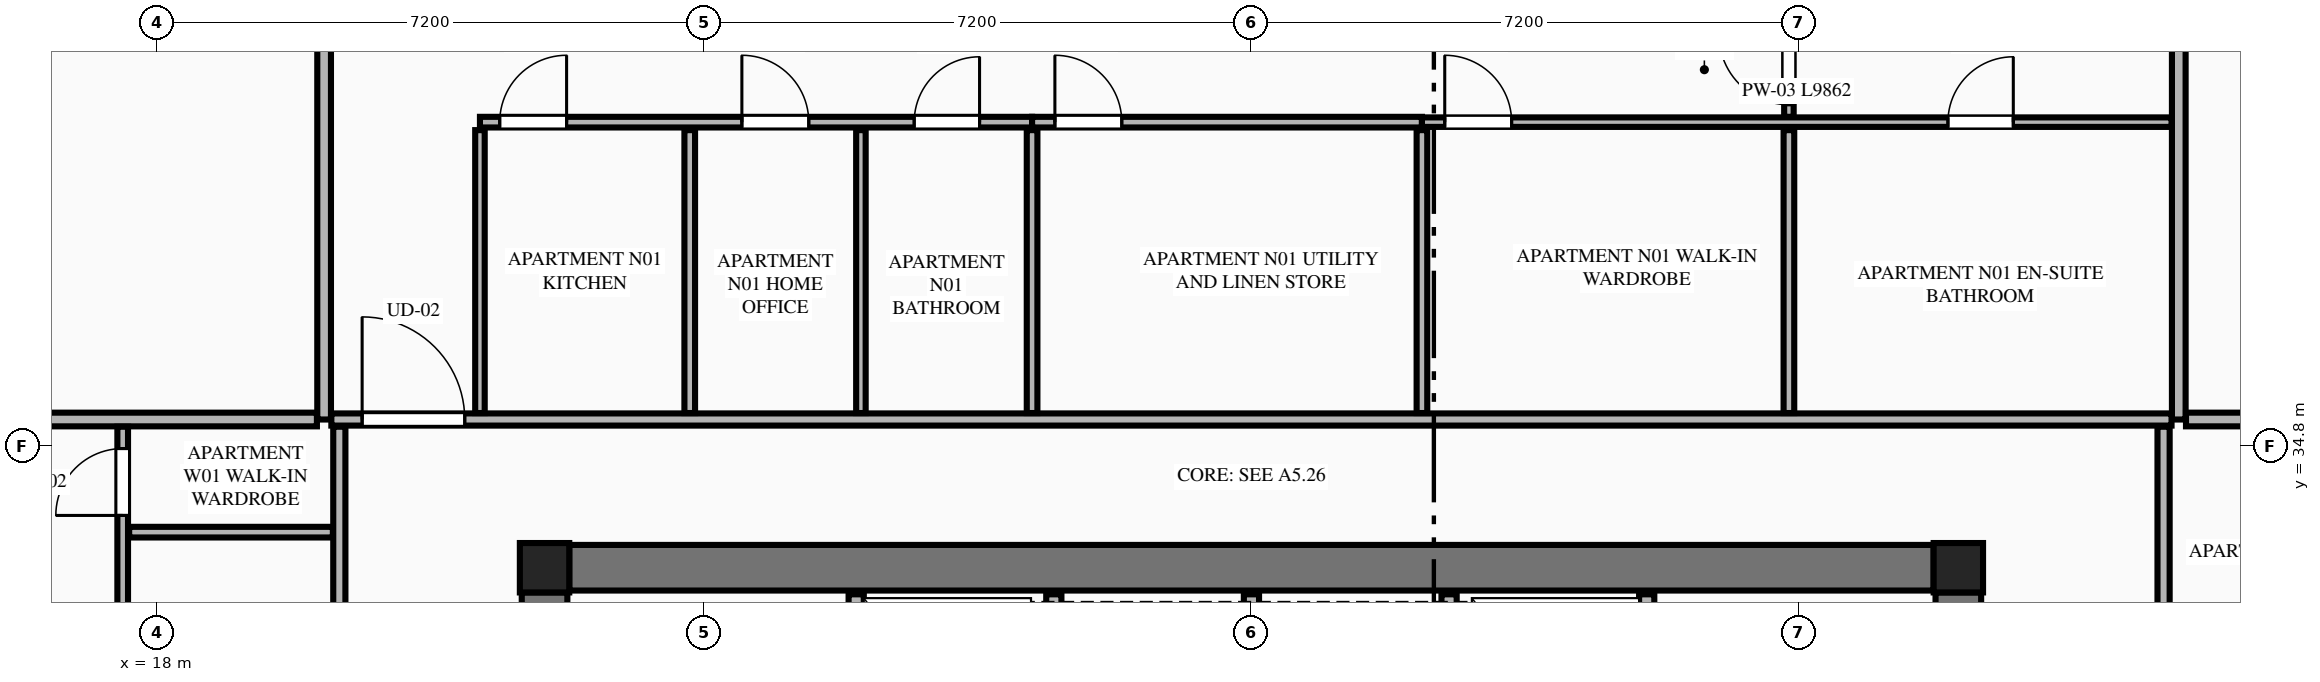
"""IFC4 building model, lengths in metres.
Left out: names, types, materials, properties, quantities, classifications, styles, units other than length and angle.
Written with IfcOpenShell. Run it as: python <this file> out.ifc"""

import sys

from ifc_helpers import new_model, si_unit, direction, frame, frame_2d, origin, origin_2d, place, context, subcontext, project, spatial, rectangle, extrude, element, fill, save


model = new_model("IFC4")
c1 = context("Model", 3, precision=1e-05, world=origin(), true_north=direction((0.0, 1.0)))
c2 = subcontext(c1, "Body", "Model", "MODEL_VIEW")
j1 = project(units=[si_unit("LENGTHUNIT", "METRE"), si_unit("PLANEANGLEUNIT", "RADIAN")], contexts=[c1])
p1 = place(None, origin())
s1 = spatial("IfcSite", under=j1, at=p1, CompositionType="ELEMENT")
p2 = place(p1, origin())
s2 = spatial("IfcBuilding", under=s1, at=p2, CompositionType="ELEMENT")
p3 = place(p2, frame((0.0, 0.0, 210.95)))
s3 = spatial("IfcBuildingStorey", under=s2, at=p3, CompositionType="ELEMENT", Elevation=210.95)
for number, where, z_axis, x_axis in (
    (1, (41.7, 33.2, 0.0), (0.0, 0.0, 1.0), (1.0, 0.0, 0.0)),
    (2, (23.1, 33.2, 0.0), (0.0, 0.0, 1.0), (1.0, 0.0, 0.0)),
):
    element("IfcColumn", number, at=place(p3, frame(where, z_axis=z_axis, x_axis=x_axis)), inside=s3, PredefinedType="COLUMN", context=c2, shape_type="SweptSolid", body=[
        extrude(rectangle(XDim=0.65, YDim=0.65, at=origin_2d()), origin(), (0.0, 0.0, 1.0), 3.55),
    ])
p4 = place(p3, frame((23.425, 33.2, 0.0), z_axis=(0.0, 0.0, 1.0), x_axis=(1.0, 0.0, 0.0)))
e3 = element("IfcWall", 3, at=p4, inside=s3, PredefinedType="SHEAR", context=c2, shape_type="SweptSolid", body=[
    extrude(rectangle(XDim=17.95, YDim=0.6, at=frame_2d((8.975, 0.0))), origin(), (0.0, 0.0, 1.0), 3.35),
])
p5 = place(p3, frame((23.1, 18.925, 0.0), z_axis=(0.0, 0.0, 1.0), x_axis=(0.0, 1.0, 0.0)))
e4 = element("IfcWall", 4, at=p5, inside=s3, PredefinedType="SHEAR", context=c2, shape_type="SweptSolid", body=[
    extrude(rectangle(XDim=13.95, YDim=0.6, at=frame_2d((6.975, 0.0))), origin(), (0.0, 0.0, 1.0), 3.35),
])
p6 = place(p5, frame((2.915, 0.0, 0.0)))
e5 = element("IfcOpeningElement", 5, at=p6, cuts=e4, PredefinedType="OPENING", context=c2, shape_type="SweptSolid", body=[
    extrude(rectangle(XDim=1.22, YDim=2.25, at=frame_2d((0.61, 1.125))), frame((0.0, 0.31, 0.0), z_axis=(0.0, -1.0, 0.0), x_axis=(1.0, 0.0, 0.0)), (0.0, 0.0, 1.0), 0.62),
])
p7 = place(p3, frame((41.7, 18.925, 0.0), z_axis=(0.0, 0.0, 1.0), x_axis=(0.0, 1.0, 0.0)))
e6 = element("IfcWall", 6, at=p7, inside=s3, PredefinedType="SHEAR", context=c2, shape_type="SweptSolid", body=[
    extrude(rectangle(XDim=13.95, YDim=0.6, at=frame_2d((6.975, 0.0))), origin(), (0.0, 0.0, 1.0), 3.35),
])
p8 = place(p7, frame((2.915, 0.0, 0.0)))
e7 = element("IfcOpeningElement", 7, at=p8, cuts=e6, PredefinedType="OPENING", context=c2, shape_type="SweptSolid", body=[
    extrude(rectangle(XDim=1.22, YDim=2.25, at=frame_2d((0.61, 1.125))), frame((0.0, 0.31, 0.0), z_axis=(0.0, -1.0, 0.0), x_axis=(1.0, 0.0, 0.0)), (0.0, 0.0, 1.0), 0.62),
])
for number, where, z_axis, x_axis in (
    (8, (27.2, 30.0, 0.0), (0.0, 0.0, 1.0), (0.0, 1.0, 0.0)),
    (9, (29.8, 30.0, 0.0), (0.0, 0.0, 1.0), (0.0, 1.0, 0.0)),
    (10, (32.4, 30.0, 0.0), (0.0, 0.0, 1.0), (0.0, 1.0, 0.0)),
    (11, (35.0, 30.0, 0.0), (0.0, 0.0, 1.0), (0.0, 1.0, 0.0)),
    (12, (37.6, 30.0, 0.0), (0.0, 0.0, 1.0), (0.0, 1.0, 0.0)),
):
    element("IfcWall", number, at=place(p3, frame(where, z_axis=z_axis, x_axis=x_axis)), inside=s3, PredefinedType="PLUMBINGWALL", context=c2, shape_type="SweptSolid", body=[
        extrude(rectangle(XDim=2.85, YDim=0.2, at=frame_2d((1.425, 0.0))), origin(), (0.0, 0.0, 1.0), 3.35),
    ])
p9 = place(p3, frame((18.06, 43.436, 0.0), z_axis=(0.0, 0.0, 1.0), x_axis=(-0.451524246964, -0.89225884944, 0.0)))
e13 = element("IfcWall", 13, at=p9, inside=s3, PredefinedType="STANDARD", context=c2, shape_type="SweptSolid", body=[
    extrude(rectangle(XDim=4.91, YDim=0.34, at=frame_2d((2.455, 0.0))), origin(), (0.0, 0.0, 1.0), 2.883),
])
p10 = place(p9, frame((1.905, 0.0, 0.75)))
e14 = element("IfcOpeningElement", 14, at=p10, cuts=e13, PredefinedType="OPENING", context=c2, shape_type="SweptSolid", body=[
    extrude(rectangle(XDim=1.1, YDim=1.983, at=frame_2d((0.55, 0.991))), frame((0.0, 0.18, 0.0), z_axis=(0.0, -1.0, 0.0), x_axis=(1.0, 0.0, 0.0)), (0.0, 0.0, 1.0), 0.36),
])
for number, where, z_axis, x_axis in (
    (15, (20.2, 35.15, 0.0), (0.0, 0.0, 1.0), (0.0, 1.0, 0.0)),
    (16, (44.6, 35.15, 0.0), (0.0, 0.0, 1.0), (0.0, 1.0, 0.0)),
):
    element("IfcWall", number, at=place(p3, frame(where, z_axis=z_axis, x_axis=x_axis)), inside=s3, PredefinedType="PARTITIONING", context=c2, shape_type="SweptSolid", body=[
        extrude(rectangle(XDim=10.482, YDim=0.18, at=frame_2d((5.241, 0.0))), origin(), (0.0, 0.0, 1.0), 3.35),
    ])
p11 = place(p3, frame((20.295, 35.15, 0.0), z_axis=(0.0, 0.0, 1.0), x_axis=(1.0, 0.0, 0.0)))
e17 = element("IfcWall", 17, at=p11, inside=s3, PredefinedType="PARTITIONING", context=c2, shape_type="SweptSolid", body=[
    extrude(rectangle(XDim=24.21, YDim=0.16, at=frame_2d((12.105, 0.0))), origin(), (0.0, 0.0, 1.0), 3.35),
])
p12 = place(p11, frame((0.405, 0.0, 0.0)))
e18 = element("IfcOpeningElement", 18, at=p12, cuts=e17, PredefinedType="OPENING", context=c2, shape_type="SweptSolid", body=[
    extrude(rectangle(XDim=1.35, YDim=2.35, at=frame_2d((0.675, 1.175))), frame((0.0, 0.09, 0.0), z_axis=(0.0, -1.0, 0.0), x_axis=(1.0, 0.0, 0.0)), (0.0, 0.0, 1.0), 0.18),
])
p13 = place(p3, frame((22.25, 35.235, 0.0), z_axis=(0.0, 0.0, 1.0), x_axis=(0.0, 1.0, 0.0)))
e19 = element("IfcWall", 19, at=p13, inside=s3, PredefinedType="PARTITIONING", context=c2, shape_type="SweptSolid", body=[
    extrude(rectangle(XDim=3.722, YDim=0.125, at=frame_2d((1.861, 0.0))), origin(), (0.0, 0.0, 1.0), 2.807),
])
p14 = place(p3, frame((22.25, 39.062, 0.0), z_axis=(0.0, 0.0, 1.0), x_axis=(1.0, 0.0, 0.0)))
e20 = element("IfcWall", 20, at=p14, inside=s3, PredefinedType="PLUMBINGWALL", context=c2, shape_type="SweptSolid", body=[
    extrude(rectangle(XDim=7.264, YDim=0.14, at=frame_2d((3.632, 0.0))), origin(), (0.0, 0.0, 1.0), 3.35),
])
p15 = place(p14, frame((5.713, 0.0, 0.0)))
e21 = element("IfcOpeningElement", 21, at=p15, cuts=e20, PredefinedType="OPENING", context=c2, shape_type="SweptSolid", body=[
    extrude(rectangle(XDim=0.86, YDim=2.1, at=frame_2d((0.43, 1.05))), frame((0.0, 0.08, 0.0), z_axis=(0.0, -1.0, 0.0), x_axis=(1.0, 0.0, 0.0)), (0.0, 0.0, 1.0), 0.16),
])
p16 = place(p14, frame((0.26, 0.0, 0.0)))
e22 = element("IfcOpeningElement", 22, at=p16, cuts=e20, PredefinedType="OPENING", context=c2, shape_type="SweptSolid", body=[
    extrude(rectangle(XDim=0.88, YDim=2.15, at=frame_2d((0.44, 1.075))), frame((0.0, 0.08, 0.0), z_axis=(0.0, -1.0, 0.0), x_axis=(1.0, 0.0, 0.0)), (0.0, 0.0, 1.0), 0.16),
])
p17 = place(p14, frame((3.446, 0.0, 0.0)))
e23 = element("IfcOpeningElement", 23, at=p17, cuts=e20, PredefinedType="OPENING", context=c2, shape_type="SweptSolid", body=[
    extrude(rectangle(XDim=0.88, YDim=2.15, at=frame_2d((0.44, 1.075))), frame((0.0, 0.08, 0.0), z_axis=(0.0, -1.0, 0.0), x_axis=(1.0, 0.0, 0.0)), (0.0, 0.0, 1.0), 0.16),
])
p18 = place(p3, frame((29.514, 39.062, 0.0), z_axis=(0.0, 0.0, 1.0), x_axis=(1.0, 0.0, 0.0)))
e24 = element("IfcWall", 24, at=p18, inside=s3, PredefinedType="PLUMBINGWALL", context=c2, shape_type="SweptSolid", body=[
    extrude(rectangle(XDim=5.129, YDim=0.14, at=frame_2d((2.564, 0.0))), origin(), (0.0, 0.0, 1.0), 3.35),
])
p19 = place(p18, frame((0.3, 0.0, 0.0)))
e25 = element("IfcOpeningElement", 25, at=p19, cuts=e24, PredefinedType="OPENING", context=c2, shape_type="SweptSolid", body=[
    extrude(rectangle(XDim=0.88, YDim=2.15, at=frame_2d((0.44, 1.075))), frame((0.0, 0.08, 0.0), z_axis=(0.0, -1.0, 0.0), x_axis=(1.0, 0.0, 0.0)), (0.0, 0.0, 1.0), 0.16),
])
p20 = place(p3, frame((34.643, 39.062, 0.0), z_axis=(0.0, 0.0, 1.0), x_axis=(1.0, 0.0, 0.0)))
e26 = element("IfcWall", 26, at=p20, inside=s3, PredefinedType="PARTITIONING", context=c2, shape_type="SweptSolid", body=[
    extrude(rectangle(XDim=9.862, YDim=0.125, at=frame_2d((4.931, 0.0))), origin(), (0.0, 0.0, 1.0), 3.35),
])
p21 = place(p20, frame((6.92, 0.0, 0.0)))
e27 = element("IfcOpeningElement", 27, at=p21, cuts=e26, PredefinedType="OPENING", context=c2, shape_type="SweptSolid", body=[
    extrude(rectangle(XDim=0.86, YDim=2.1, at=frame_2d((0.43, 1.05))), frame((0.0, 0.073, 0.0), z_axis=(0.0, -1.0, 0.0), x_axis=(1.0, 0.0, 0.0)), (0.0, 0.0, 1.0), 0.145),
])
p22 = place(p20, frame((0.3, 0.0, 0.0)))
e28 = element("IfcOpeningElement", 28, at=p22, cuts=e26, PredefinedType="OPENING", context=c2, shape_type="SweptSolid", body=[
    extrude(rectangle(XDim=0.88, YDim=2.15, at=frame_2d((0.44, 1.075))), frame((0.0, 0.073, 0.0), z_axis=(0.0, -1.0, 0.0), x_axis=(1.0, 0.0, 0.0)), (0.0, 0.0, 1.0), 0.145),
])
p23 = place(p3, frame((25.01, 35.235, 0.0), z_axis=(0.0, 0.0, 1.0), x_axis=(0.0, 1.0, 0.0)))
e29 = element("IfcWall", 29, at=p23, inside=s3, PredefinedType="PLUMBINGWALL", context=c2, shape_type="SweptSolid", body=[
    extrude(rectangle(XDim=3.722, YDim=0.14, at=frame_2d((1.861, 0.0))), origin(), (0.0, 0.0, 1.0), 3.35),
])
p24 = place(p3, frame((27.262, 35.235, 0.0), z_axis=(0.0, 0.0, 1.0), x_axis=(0.0, 1.0, 0.0)))
e30 = element("IfcWall", 30, at=p24, inside=s3, PredefinedType="PARTITIONING", context=c2, shape_type="SweptSolid", body=[
    extrude(rectangle(XDim=3.722, YDim=0.125, at=frame_2d((1.861, 0.0))), origin(), (0.0, 0.0, 1.0), 3.35),
])
p25 = place(p3, frame((39.471, 39.132, 0.0), z_axis=(0.0, 0.0, 1.0), x_axis=(0.0, 1.0, 0.0)))
e31 = element("IfcWall", 31, at=p25, inside=s3, PredefinedType="PARTITIONING", context=c2, shape_type="SweptSolid", body=[
    extrude(rectangle(XDim=1.33, YDim=0.125, at=frame_2d((0.665, 0.0))), origin(), (0.0, 0.0, 1.0), 3.35),
])
p26 = place(p25, frame((0.16, 0.0, 0.0)))
e32 = element("IfcOpeningElement", 32, at=p26, cuts=e31, PredefinedType="OPENING", context=c2, shape_type="SweptSolid", body=[
    extrude(rectangle(XDim=0.92, YDim=2.15, at=frame_2d((0.46, 1.075))), frame((0.0, 0.073, 0.0), z_axis=(0.0, -1.0, 0.0), x_axis=(1.0, 0.0, 0.0)), (0.0, 0.0, 1.0), 0.145),
])
for number, where, z_axis, x_axis in (
    (33, (29.514, 35.235, 0.0), (0.0, 0.0, 1.0), (0.0, 1.0, 0.0)),
    (34, (34.643, 35.235, 0.0), (0.0, 0.0, 1.0), (0.0, 1.0, 0.0)),
    (35, (39.471, 35.235, 0.0), (0.0, 0.0, 1.0), (0.0, 1.0, 0.0)),
):
    element("IfcWall", number, at=place(p3, frame(where, z_axis=z_axis, x_axis=x_axis)), inside=s3, PredefinedType="PLUMBINGWALL", context=c2, shape_type="SweptSolid", body=[
        extrude(rectangle(XDim=3.722, YDim=0.14, at=frame_2d((1.861, 0.0))), origin(), (0.0, 0.0, 1.0), 3.35),
    ])
for number, where, z_axis, x_axis in (
    (36, (14.11, 35.15, 0.0), (0.0, 0.0, 1.0), (1.0, 0.0, 0.0)),
    (37, (44.695, 35.15, 0.0), (0.0, 0.0, 1.0), (1.0, 0.0, 0.0)),
):
    element("IfcWall", number, at=place(p3, frame(where, z_axis=z_axis, x_axis=x_axis)), inside=s3, PredefinedType="PARTITIONING", context=c2, shape_type="SweptSolid", body=[
        extrude(rectangle(XDim=5.995, YDim=0.18, at=frame_2d((2.998, 0.0))), origin(), (0.0, 0.0, 1.0), 3.35),
    ])
p27 = place(p3, frame((20.4, 16.345, 0.0), z_axis=(0.0, 0.0, 1.0), x_axis=(0.0, 1.0, 0.0)))
e38 = element("IfcWall", 38, at=p27, inside=s3, PredefinedType="PARTITIONING", context=c2, shape_type="SweptSolid", body=[
    extrude(rectangle(XDim=18.71, YDim=0.16, at=frame_2d((9.355, 0.0))), origin(), (0.0, 0.0, 1.0), 3.35),
])
p28 = place(p27, frame((0.45, 0.0, 0.0)))
e39 = element("IfcOpeningElement", 39, at=p28, cuts=e38, PredefinedType="OPENING", context=c2, shape_type="SweptSolid", body=[
    extrude(rectangle(XDim=1.02, YDim=2.25, at=frame_2d((0.51, 1.125))), frame((0.0, 0.09, 0.0), z_axis=(0.0, -1.0, 0.0), x_axis=(1.0, 0.0, 0.0)), (0.0, 0.0, 1.0), 0.18),
])
p29 = place(p3, frame((17.55, 28.499, 0.0), z_axis=(0.0, 0.0, 1.0), x_axis=(0.0, 1.0, 0.0)))
e40 = element("IfcWall", 40, at=p29, inside=s3, PredefinedType="PLUMBINGWALL", context=c2, shape_type="SweptSolid", body=[
    extrude(rectangle(XDim=6.556, YDim=0.14, at=frame_2d((3.278, 0.0))), origin(), (0.0, 0.0, 1.0), 3.35),
])
p30 = place(p29, frame((0.22, 0.0, 0.0)))
e41 = element("IfcOpeningElement", 41, at=p30, cuts=e40, PredefinedType="OPENING", context=c2, shape_type="SweptSolid", body=[
    extrude(rectangle(XDim=0.86, YDim=2.1, at=frame_2d((0.43, 1.05))), frame((0.0, 0.08, 0.0), z_axis=(0.0, -1.0, 0.0), x_axis=(1.0, 0.0, 0.0)), (0.0, 0.0, 1.0), 0.16),
])
p31 = place(p29, frame((5.389, 0.0, 0.0)))
e42 = element("IfcOpeningElement", 42, at=p31, cuts=e40, PredefinedType="OPENING", context=c2, shape_type="SweptSolid", body=[
    extrude(rectangle(XDim=0.88, YDim=2.15, at=frame_2d((0.44, 1.075))), frame((0.0, 0.08, 0.0), z_axis=(0.0, -1.0, 0.0), x_axis=(1.0, 0.0, 0.0)), (0.0, 0.0, 1.0), 0.16),
])
p32 = place(p3, frame((17.635, 33.668, 0.0), z_axis=(0.0, 0.0, 1.0), x_axis=(1.0, 0.0, 0.0)))
e43 = element("IfcWall", 43, at=p32, inside=s3, PredefinedType="PLUMBINGWALL", context=c2, shape_type="SweptSolid", body=[
    extrude(rectangle(XDim=2.68, YDim=0.14, at=frame_2d((1.34, 0.0))), origin(), (0.0, 0.0, 1.0), 3.35),
])
p33 = place(p3, frame((44.4, 16.345, 0.0), z_axis=(0.0, 0.0, 1.0), x_axis=(0.0, 1.0, 0.0)))
e44 = element("IfcWall", 44, at=p33, inside=s3, PredefinedType="PARTITIONING", context=c2, shape_type="SweptSolid", body=[
    extrude(rectangle(XDim=18.71, YDim=0.16, at=frame_2d((9.355, 0.0))), origin(), (0.0, 0.0, 1.0), 3.35),
])
p34 = place(p33, frame((0.45, 0.0, 0.0)))
e45 = element("IfcOpeningElement", 45, at=p34, cuts=e44, PredefinedType="OPENING", context=c2, shape_type="SweptSolid", body=[
    extrude(rectangle(XDim=1.02, YDim=2.25, at=frame_2d((0.51, 1.125))), frame((0.0, 0.09, 0.0), z_axis=(0.0, -1.0, 0.0), x_axis=(1.0, 0.0, 0.0)), (0.0, 0.0, 1.0), 0.18),
])
p35 = place(p15, origin())
e46 = element("IfcDoor", 46, at=p35, inside=s3, OperationType="SINGLE_SWING_RIGHT", PredefinedType="DOOR", context=c2, shape_type="SweptSolid", body=[
    extrude(rectangle(XDim=0.86, YDim=2.1, at=frame_2d((0.43, 1.05))), frame((0.0, 0.025, 0.0), z_axis=(0.0, -1.0, 0.0), x_axis=(1.0, 0.0, 0.0)), (0.0, 0.0, 1.0), 0.05),
])
fill(e21, e46)
p36 = place(p21, origin())
e47 = element("IfcDoor", 47, at=p36, inside=s3, OperationType="SINGLE_SWING_RIGHT", PredefinedType="DOOR", context=c2, shape_type="SweptSolid", body=[
    extrude(rectangle(XDim=0.86, YDim=2.1, at=frame_2d((0.43, 1.05))), frame((0.0, 0.025, 0.0), z_axis=(0.0, -1.0, 0.0), x_axis=(1.0, 0.0, 0.0)), (0.0, 0.0, 1.0), 0.05),
])
fill(e27, e47)
p37 = place(p12, origin())
e48 = element("IfcDoor", 48, at=p37, inside=s3, OperationType="SINGLE_SWING_LEFT", PredefinedType="DOOR", context=c2, shape_type="SweptSolid", body=[
    extrude(rectangle(XDim=1.35, YDim=2.35, at=frame_2d((0.675, 1.175))), frame((0.0, 0.025, 0.0), z_axis=(0.0, -1.0, 0.0), x_axis=(1.0, 0.0, 0.0)), (0.0, 0.0, 1.0), 0.05),
])
fill(e18, e48)
p38 = place(p16, origin())
e49 = element("IfcDoor", 49, at=p38, inside=s3, OperationType="SINGLE_SWING_RIGHT", PredefinedType="DOOR", context=c2, shape_type="SweptSolid", body=[
    extrude(rectangle(XDim=0.88, YDim=2.15, at=frame_2d((0.44, 1.075))), frame((0.0, 0.025, 0.0), z_axis=(0.0, -1.0, 0.0), x_axis=(1.0, 0.0, 0.0)), (0.0, 0.0, 1.0), 0.05),
])
fill(e22, e49)
p39 = place(p17, origin())
e50 = element("IfcDoor", 50, at=p39, inside=s3, OperationType="SINGLE_SWING_LEFT", PredefinedType="DOOR", context=c2, shape_type="SweptSolid", body=[
    extrude(rectangle(XDim=0.88, YDim=2.15, at=frame_2d((0.44, 1.075))), frame((0.0, 0.025, 0.0), z_axis=(0.0, -1.0, 0.0), x_axis=(1.0, 0.0, 0.0)), (0.0, 0.0, 1.0), 0.05),
])
fill(e23, e50)
p40 = place(p19, origin())
e51 = element("IfcDoor", 51, at=p40, inside=s3, OperationType="SINGLE_SWING_LEFT", PredefinedType="DOOR", context=c2, shape_type="SweptSolid", body=[
    extrude(rectangle(XDim=0.88, YDim=2.15, at=frame_2d((0.44, 1.075))), frame((0.0, 0.025, 0.0), z_axis=(0.0, -1.0, 0.0), x_axis=(1.0, 0.0, 0.0)), (0.0, 0.0, 1.0), 0.05),
])
fill(e25, e51)
p41 = place(p26, origin())
e52 = element("IfcDoor", 52, at=p41, inside=s3, OperationType="SINGLE_SWING_RIGHT", PredefinedType="DOOR", context=c2, shape_type="SweptSolid", body=[
    extrude(rectangle(XDim=0.92, YDim=2.15, at=frame_2d((0.46, 1.075))), frame((0.0, 0.025, 0.0), z_axis=(0.0, -1.0, 0.0), x_axis=(1.0, 0.0, 0.0)), (0.0, 0.0, 1.0), 0.05),
])
fill(e32, e52)
p42 = place(p22, origin())
e53 = element("IfcDoor", 53, at=p42, inside=s3, OperationType="SINGLE_SWING_LEFT", PredefinedType="DOOR", context=c2, shape_type="SweptSolid", body=[
    extrude(rectangle(XDim=0.88, YDim=2.15, at=frame_2d((0.44, 1.075))), frame((0.0, 0.025, 0.0), z_axis=(0.0, -1.0, 0.0), x_axis=(1.0, 0.0, 0.0)), (0.0, 0.0, 1.0), 0.05),
])
fill(e28, e53)
p43 = place(p31, origin())
e54 = element("IfcDoor", 54, at=p43, inside=s3, OperationType="SINGLE_SWING_LEFT", PredefinedType="DOOR", context=c2, shape_type="SweptSolid", body=[
    extrude(rectangle(XDim=0.88, YDim=2.15, at=frame_2d((0.44, 1.075))), frame((0.0, 0.025, 0.0), z_axis=(0.0, -1.0, 0.0), x_axis=(1.0, 0.0, 0.0)), (0.0, 0.0, 1.0), 0.05),
])
fill(e42, e54)
save(model, sys.argv[1])
